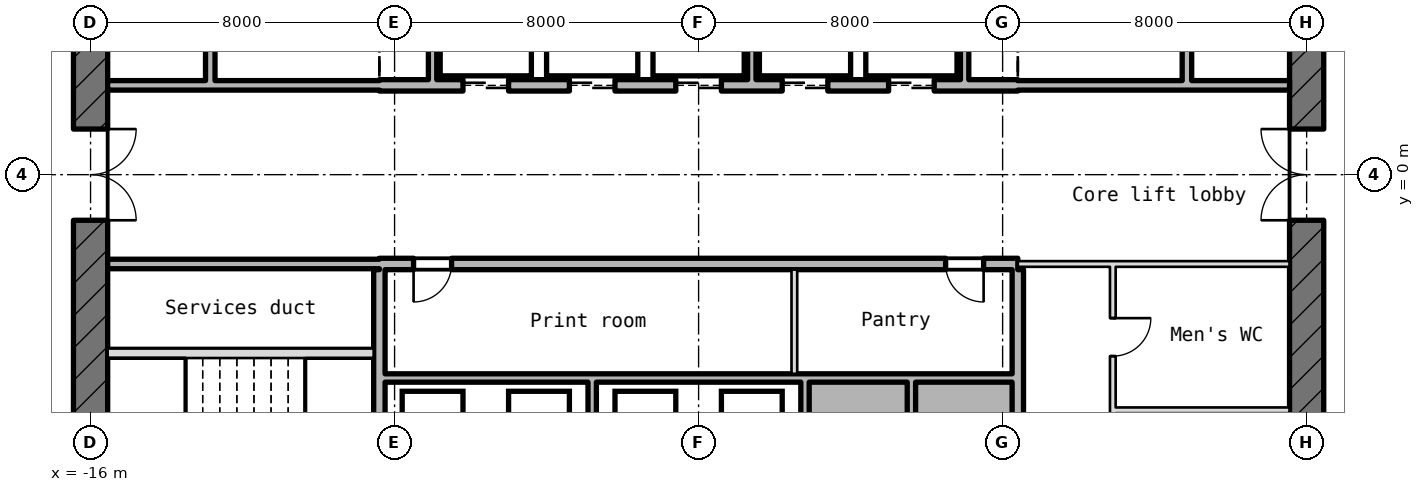
"""IFC4 building model, lengths in metres.
Left out: names, types, materials, properties, quantities, classifications, styles, units other than length and angle.
Written with IfcOpenShell. Run it as: python <this file> out.ifc"""

import sys

from ifc_helpers import new_model, si_unit, direction, frame, frame_2d, origin, place, context, subcontext, project, spatial, rectangle, extrude, element, fill, save


model = new_model("IFC4")
c1 = context("Model", 3, precision=1e-05, world=origin(), true_north=direction((0.0, 1.0)))
c2 = subcontext(c1, "Body", "Model", "MODEL_VIEW")
j1 = project(units=[si_unit("LENGTHUNIT", "METRE"), si_unit("PLANEANGLEUNIT", "RADIAN")], contexts=[c1])
p1 = place(None, origin())
s1 = spatial("IfcSite", under=j1, at=p1, CompositionType="ELEMENT")
p2 = place(p1, origin())
s2 = spatial("IfcBuilding", under=s1, at=p2, CompositionType="ELEMENT")
p3 = place(p2, frame((0.0, 0.0, 155.65)))
s3 = spatial("IfcBuildingStorey", under=s2, at=p3, CompositionType="ELEMENT", Elevation=155.65)
p4 = place(p3, frame((16.0, -10.186, -0.25), z_axis=(0.0, 0.0, 1.0), x_axis=(0.0, 1.0, 0.0)))
e1 = element("IfcWall", 1, at=p4, inside=s3, PredefinedType="SHEAR", context=c2, shape_type="SweptSolid", body=[
    extrude(rectangle(XDim=20.373, YDim=0.9, at=frame_2d((10.186, 0.0))), origin(), (0.0, 0.0, 1.0), 5.47),
])
p5 = place(p4, frame((8.986, 0.0, 0.25)))
e2 = element("IfcOpeningElement", 2, at=p5, cuts=e1, PredefinedType="OPENING", context=c2, shape_type="SweptSolid", body=[
    extrude(rectangle(XDim=2.4, YDim=2.1, at=frame_2d((1.2, 1.05))), frame((0.0, 0.46, 0.0), z_axis=(0.0, -1.0, 0.0), x_axis=(1.0, 0.0, 0.0)), (0.0, 0.0, 1.0), 0.92),
])
p6 = place(p4, frame((13.586, 0.0, 0.25)))
e3 = element("IfcOpeningElement", 3, at=p6, cuts=e1, PredefinedType="OPENING", context=c2, shape_type="SweptSolid", body=[
    extrude(rectangle(XDim=1.2, YDim=2.1, at=frame_2d((0.6, 1.05))), frame((0.0, 0.46, 0.0), z_axis=(0.0, -1.0, 0.0), x_axis=(1.0, 0.0, 0.0)), (0.0, 0.0, 1.0), 0.92),
])
p7 = place(p3, frame((-16.0, 10.186, -0.25), z_axis=(0.0, 0.0, 1.0), x_axis=(0.0, -1.0, 0.0)))
e4 = element("IfcWall", 4, at=p7, inside=s3, PredefinedType="SHEAR", context=c2, shape_type="SweptSolid", body=[
    extrude(rectangle(XDim=20.373, YDim=0.9, at=frame_2d((10.186, 0.0))), origin(), (0.0, 0.0, 1.0), 5.47),
])
p8 = place(p7, frame((8.986, 0.0, 0.25)))
e5 = element("IfcOpeningElement", 5, at=p8, cuts=e4, PredefinedType="OPENING", context=c2, shape_type="SweptSolid", body=[
    extrude(rectangle(XDim=2.4, YDim=2.1, at=frame_2d((1.2, 1.05))), frame((0.0, 0.46, 0.0), z_axis=(0.0, -1.0, 0.0), x_axis=(1.0, 0.0, 0.0)), (0.0, 0.0, 1.0), 0.92),
])
p9 = place(p7, frame((5.586, 0.0, 0.25)))
e6 = element("IfcOpeningElement", 6, at=p9, cuts=e4, PredefinedType="OPENING", context=c2, shape_type="SweptSolid", body=[
    extrude(rectangle(XDim=1.2, YDim=2.1, at=frame_2d((0.6, 1.05))), frame((0.0, 0.46, 0.0), z_axis=(0.0, -1.0, 0.0), x_axis=(1.0, 0.0, 0.0)), (0.0, 0.0, 1.0), 0.92),
])
p10 = place(p3, frame((10.975, -6.2, 0.0), z_axis=(0.0, 0.0, 1.0), x_axis=(1.0, 0.0, 0.0)))
e7 = element("IfcWall", 7, at=p10, inside=s3, PredefinedType="PARTITIONING", context=c2, shape_type="SweptSolid", body=[
    extrude(rectangle(XDim=4.575, YDim=0.15, at=frame_2d((2.288, 0.0))), origin(), (0.0, 0.0, 1.0), 5.22),
])
p11 = place(p3, frame((-8.25, -5.35, 0.0), z_axis=(0.0, 0.0, 1.0), x_axis=(1.0, 0.0, 0.0)))
e8 = element("IfcWall", 8, at=p11, inside=s3, PredefinedType="STANDARD", context=c2, shape_type="SweptSolid", body=[
    extrude(rectangle(XDim=16.5, YDim=0.22, at=frame_2d((8.25, 0.0))), origin(), (0.0, 0.0, 1.0), 5.22),
])
p12 = place(p3, frame((-15.55, -4.7, -0.25), z_axis=(0.0, 0.0, 1.0), x_axis=(1.0, 0.0, 0.0)))
e9 = element("IfcWall", 9, at=p12, inside=s3, PredefinedType="SHEAR", context=c2, shape_type="SweptSolid", body=[
    extrude(rectangle(XDim=7.0, YDim=0.25, at=frame_2d((3.5, 0.0))), origin(), (0.0, 0.0, 1.0), 5.47),
])
p13 = place(p3, frame((-15.55, -2.35, 0.0), z_axis=(0.0, 0.0, 1.0), x_axis=(1.0, 0.0, 0.0)))
e10 = element("IfcWall", 10, at=p13, inside=s3, PredefinedType="STANDARD", context=c2, shape_type="SweptSolid", body=[
    extrude(rectangle(XDim=7.15, YDim=0.25, at=frame_2d((3.575, 0.0))), origin(), (0.0, 0.0, 1.0), 5.22),
])
p14 = place(p3, frame((-8.4, -2.35, -0.25), z_axis=(0.0, 0.0, 1.0), x_axis=(1.0, 0.0, 0.0)))
e11 = element("IfcWall", 11, at=p14, inside=s3, PredefinedType="SHEAR", context=c2, shape_type="SweptSolid", body=[
    extrude(rectangle(XDim=16.8, YDim=0.3, at=frame_2d((8.4, 0.0))), origin(), (0.0, 0.0, 1.0), 5.47),
])
p15 = place(p14, frame((0.9, 0.0, 0.25)))
e12 = element("IfcOpeningElement", 12, at=p15, cuts=e11, PredefinedType="OPENING", context=c2, shape_type="SweptSolid", body=[
    extrude(rectangle(XDim=1.0, YDim=2.1, at=frame_2d((0.5, 1.05))), frame((0.0, 0.16, 0.0), z_axis=(0.0, -1.0, 0.0), x_axis=(1.0, 0.0, 0.0)), (0.0, 0.0, 1.0), 0.32),
])
p16 = place(p14, frame((14.9, 0.0, 0.25)))
e13 = element("IfcOpeningElement", 13, at=p16, cuts=e11, PredefinedType="OPENING", context=c2, shape_type="SweptSolid", body=[
    extrude(rectangle(XDim=1.0, YDim=2.1, at=frame_2d((0.5, 1.05))), frame((0.0, 0.16, 0.0), z_axis=(0.0, -1.0, 0.0), x_axis=(1.0, 0.0, 0.0)), (0.0, 0.0, 1.0), 0.32),
])
p17 = place(p3, frame((8.4, -2.35, 0.0), z_axis=(0.0, 0.0, 1.0), x_axis=(1.0, 0.0, 0.0)))
e14 = element("IfcWall", 14, at=p17, inside=s3, PredefinedType="PARTITIONING", context=c2, shape_type="SweptSolid", body=[
    extrude(rectangle(XDim=7.15, YDim=0.15, at=frame_2d((3.575, 0.0))), origin(), (0.0, 0.0, 1.0), 5.22),
])
p18 = place(p3, frame((-15.55, 2.35, 0.0), z_axis=(0.0, 0.0, 1.0), x_axis=(1.0, 0.0, 0.0)))
e15 = element("IfcWall", 15, at=p18, inside=s3, PredefinedType="STANDARD", context=c2, shape_type="SweptSolid", body=[
    extrude(rectangle(XDim=7.15, YDim=0.25, at=frame_2d((3.575, 0.0))), origin(), (0.0, 0.0, 1.0), 5.22),
])
p19 = place(p3, frame((-8.4, 2.35, -0.25), z_axis=(0.0, 0.0, 1.0), x_axis=(1.0, 0.0, 0.0)))
e16 = element("IfcWall", 16, at=p19, inside=s3, PredefinedType="SHEAR", context=c2, shape_type="SweptSolid", body=[
    extrude(rectangle(XDim=16.8, YDim=0.3, at=frame_2d((8.4, 0.0))), origin(), (0.0, 0.0, 1.0), 5.47),
])
p20 = place(p19, frame((2.2, 0.0, 0.25)))
e17 = element("IfcOpeningElement", 17, at=p20, cuts=e16, PredefinedType="OPENING", context=c2, shape_type="SweptSolid", body=[
    extrude(rectangle(XDim=1.2, YDim=2.1, at=frame_2d((0.6, 1.05))), frame((0.0, 0.16, 0.0), z_axis=(0.0, -1.0, 0.0), x_axis=(1.0, 0.0, 0.0)), (0.0, 0.0, 1.0), 0.32),
])
p21 = place(p19, frame((5.0, 0.0, 0.25)))
e18 = element("IfcOpeningElement", 18, at=p21, cuts=e16, PredefinedType="OPENING", context=c2, shape_type="SweptSolid", body=[
    extrude(rectangle(XDim=1.2, YDim=2.1, at=frame_2d((0.6, 1.05))), frame((0.0, 0.16, 0.0), z_axis=(0.0, -1.0, 0.0), x_axis=(1.0, 0.0, 0.0)), (0.0, 0.0, 1.0), 0.32),
])
p22 = place(p19, frame((7.8, 0.0, 0.25)))
e19 = element("IfcOpeningElement", 19, at=p22, cuts=e16, PredefinedType="OPENING", context=c2, shape_type="SweptSolid", body=[
    extrude(rectangle(XDim=1.2, YDim=2.1, at=frame_2d((0.6, 1.05))), frame((0.0, 0.16, 0.0), z_axis=(0.0, -1.0, 0.0), x_axis=(1.0, 0.0, 0.0)), (0.0, 0.0, 1.0), 0.32),
])
p23 = place(p19, frame((10.6, 0.0, 0.25)))
e20 = element("IfcOpeningElement", 20, at=p23, cuts=e16, PredefinedType="OPENING", context=c2, shape_type="SweptSolid", body=[
    extrude(rectangle(XDim=1.2, YDim=2.1, at=frame_2d((0.6, 1.05))), frame((0.0, 0.16, 0.0), z_axis=(0.0, -1.0, 0.0), x_axis=(1.0, 0.0, 0.0)), (0.0, 0.0, 1.0), 0.32),
])
p24 = place(p19, frame((13.4, 0.0, 0.25)))
e21 = element("IfcOpeningElement", 21, at=p24, cuts=e16, PredefinedType="OPENING", context=c2, shape_type="SweptSolid", body=[
    extrude(rectangle(XDim=1.2, YDim=2.1, at=frame_2d((0.6, 1.05))), frame((0.0, 0.16, 0.0), z_axis=(0.0, -1.0, 0.0), x_axis=(1.0, 0.0, 0.0)), (0.0, 0.0, 1.0), 0.32),
])
p25 = place(p3, frame((8.4, 2.35, 0.0), z_axis=(0.0, 0.0, 1.0), x_axis=(1.0, 0.0, 0.0)))
e22 = element("IfcWall", 22, at=p25, inside=s3, PredefinedType="STANDARD", context=c2, shape_type="SweptSolid", body=[
    extrude(rectangle(XDim=7.15, YDim=0.25, at=frame_2d((3.575, 0.0))), origin(), (0.0, 0.0, 1.0), 5.22),
])
p26 = place(p3, frame((-12.85, 2.475, 0.0), z_axis=(0.0, 0.0, 1.0), x_axis=(0.0, 1.0, 0.0)))
e23 = element("IfcWall", 23, at=p26, inside=s3, PredefinedType="STANDARD", context=c2, shape_type="SweptSolid", body=[
    extrude(rectangle(XDim=3.05, YDim=0.25, at=frame_2d((1.525, 0.0))), origin(), (0.0, 0.0, 1.0), 5.22),
])
p27 = place(p3, frame((-8.4, -8.75, -0.25), z_axis=(0.0, 0.0, 1.0), x_axis=(0.0, 1.0, 0.0)))
e24 = element("IfcWall", 24, at=p27, inside=s3, PredefinedType="SHEAR", context=c2, shape_type="SweptSolid", body=[
    extrude(rectangle(XDim=6.25, YDim=0.3, at=frame_2d((3.125, 0.0))), origin(), (0.0, 0.0, 1.0), 5.47),
])
p28 = place(p3, frame((-7.0, 2.5, 0.0), z_axis=(0.0, 0.0, 1.0), x_axis=(0.0, 1.0, 0.0)))
e25 = element("IfcWall", 25, at=p28, inside=s3, PredefinedType="STANDARD", context=c2, shape_type="SweptSolid", body=[
    extrude(rectangle(XDim=2.74, YDim=0.22, at=frame_2d((1.37, 0.0))), origin(), (0.0, 0.0, 1.0), 5.22),
])
p29 = place(p3, frame((-2.8, -8.35, 0.0), z_axis=(0.0, 0.0, 1.0), x_axis=(0.0, 1.0, 0.0)))
e26 = element("IfcWall", 26, at=p29, inside=s3, PredefinedType="STANDARD", context=c2, shape_type="SweptSolid", body=[
    extrude(rectangle(XDim=2.89, YDim=0.22, at=frame_2d((1.445, 0.0))), origin(), (0.0, 0.0, 1.0), 5.22),
])
p30 = place(p3, frame((1.4, 2.5, 0.0), z_axis=(0.0, 0.0, 1.0), x_axis=(0.0, 1.0, 0.0)))
e27 = element("IfcWall", 27, at=p30, inside=s3, PredefinedType="STANDARD", context=c2, shape_type="SweptSolid", body=[
    extrude(rectangle(XDim=2.74, YDim=0.22, at=frame_2d((1.37, 0.0))), origin(), (0.0, 0.0, 1.0), 5.22),
])
p31 = place(p3, frame((2.52, -5.24, 0.0), z_axis=(0.0, 0.0, 1.0), x_axis=(0.0, 1.0, 0.0)))
e28 = element("IfcWall", 28, at=p31, inside=s3, PredefinedType="PARTITIONING", context=c2, shape_type="SweptSolid", body=[
    extrude(rectangle(XDim=2.74, YDim=0.15, at=frame_2d((1.37, 0.0))), origin(), (0.0, 0.0, 1.0), 5.22),
])
for number, where, z_axis, x_axis in (
    (29, (2.8, -8.24, 0.0), (0.0, 0.0, 1.0), (0.0, 1.0, 0.0)),
    (30, (5.6, -8.24, 0.0), (0.0, 0.0, 1.0), (0.0, 1.0, 0.0)),
):
    element("IfcWall", number, at=place(p3, frame(where, z_axis=z_axis, x_axis=x_axis)), inside=s3, PredefinedType="STANDARD", context=c2, shape_type="SweptSolid", body=[
        extrude(rectangle(XDim=2.78, YDim=0.22, at=frame_2d((1.39, 0.0))), origin(), (0.0, 0.0, 1.0), 5.22),
    ])
p32 = place(p3, frame((7.0, 2.5, 0.0), z_axis=(0.0, 0.0, 1.0), x_axis=(0.0, 1.0, 0.0)))
e31 = element("IfcWall", 31, at=p32, inside=s3, PredefinedType="STANDARD", context=c2, shape_type="SweptSolid", body=[
    extrude(rectangle(XDim=2.74, YDim=0.22, at=frame_2d((1.37, 0.0))), origin(), (0.0, 0.0, 1.0), 5.22),
])
p33 = place(p3, frame((8.4, -8.35, -0.25), z_axis=(0.0, 0.0, 1.0), x_axis=(0.0, 1.0, 0.0)))
e32 = element("IfcWall", 32, at=p33, inside=s3, PredefinedType="SHEAR", context=c2, shape_type="SweptSolid", body=[
    extrude(rectangle(XDim=5.85, YDim=0.3, at=frame_2d((2.925, 0.0))), origin(), (0.0, 0.0, 1.0), 5.47),
])
p34 = place(p3, frame((10.9, -12.55, 0.0), z_axis=(0.0, 0.0, 1.0), x_axis=(0.0, 1.0, 0.0)))
e33 = element("IfcWall", 33, at=p34, inside=s3, PredefinedType="PARTITIONING", context=c2, shape_type="SweptSolid", body=[
    extrude(rectangle(XDim=10.125, YDim=0.15, at=frame_2d((5.062, 0.0))), origin(), (0.0, 0.0, 1.0), 5.22),
])
p35 = place(p34, frame((7.775, 0.0, 0.0)))
e34 = element("IfcOpeningElement", 34, at=p35, cuts=e33, PredefinedType="OPENING", context=c2, shape_type="SweptSolid", body=[
    extrude(rectangle(XDim=1.0, YDim=2.1, at=frame_2d((0.5, 1.05))), frame((0.0, 0.085, 0.0), z_axis=(0.0, -1.0, 0.0), x_axis=(1.0, 0.0, 0.0)), (0.0, 0.0, 1.0), 0.17),
])
p36 = place(p34, frame((2.675, 0.0, 0.0)))
e35 = element("IfcOpeningElement", 35, at=p36, cuts=e33, PredefinedType="OPENING", context=c2, shape_type="SweptSolid", body=[
    extrude(rectangle(XDim=1.0, YDim=2.1, at=frame_2d((0.5, 1.05))), frame((0.0, 0.085, 0.0), z_axis=(0.0, -1.0, 0.0), x_axis=(1.0, 0.0, 0.0)), (0.0, 0.0, 1.0), 0.17),
])
p37 = place(p3, frame((12.85, 2.475, 0.0), z_axis=(0.0, 0.0, 1.0), x_axis=(0.0, 1.0, 0.0)))
e36 = element("IfcWall", 36, at=p37, inside=s3, PredefinedType="STANDARD", context=c2, shape_type="SweptSolid", body=[
    extrude(rectangle(XDim=3.05, YDim=0.25, at=frame_2d((1.525, 0.0))), origin(), (0.0, 0.0, 1.0), 5.22),
])
p38 = place(p20, origin())
e37 = element("IfcDoor", 37, at=p38, inside=s3, OperationType="DOUBLE_DOOR_SLIDING", PredefinedType="DOOR", context=c2, shape_type="SweptSolid", body=[
    extrude(rectangle(XDim=1.2, YDim=2.1, at=frame_2d((0.6, 1.05))), frame((0.0, 0.025, 0.0), z_axis=(0.0, -1.0, 0.0), x_axis=(1.0, 0.0, 0.0)), (0.0, 0.0, 1.0), 0.05),
])
fill(e17, e37)
p39 = place(p21, origin())
e38 = element("IfcDoor", 38, at=p39, inside=s3, OperationType="DOUBLE_DOOR_SLIDING", PredefinedType="DOOR", context=c2, shape_type="SweptSolid", body=[
    extrude(rectangle(XDim=1.2, YDim=2.1, at=frame_2d((0.6, 1.05))), frame((0.0, 0.025, 0.0), z_axis=(0.0, -1.0, 0.0), x_axis=(1.0, 0.0, 0.0)), (0.0, 0.0, 1.0), 0.05),
])
fill(e18, e38)
p40 = place(p22, origin())
e39 = element("IfcDoor", 39, at=p40, inside=s3, OperationType="DOUBLE_DOOR_SLIDING", PredefinedType="DOOR", context=c2, shape_type="SweptSolid", body=[
    extrude(rectangle(XDim=1.2, YDim=2.1, at=frame_2d((0.6, 1.05))), frame((0.0, 0.025, 0.0), z_axis=(0.0, -1.0, 0.0), x_axis=(1.0, 0.0, 0.0)), (0.0, 0.0, 1.0), 0.05),
])
fill(e19, e39)
p41 = place(p23, origin())
e40 = element("IfcDoor", 40, at=p41, inside=s3, OperationType="DOUBLE_DOOR_SLIDING", PredefinedType="DOOR", context=c2, shape_type="SweptSolid", body=[
    extrude(rectangle(XDim=1.2, YDim=2.1, at=frame_2d((0.6, 1.05))), frame((0.0, 0.025, 0.0), z_axis=(0.0, -1.0, 0.0), x_axis=(1.0, 0.0, 0.0)), (0.0, 0.0, 1.0), 0.05),
])
fill(e20, e40)
p42 = place(p24, origin())
e41 = element("IfcDoor", 41, at=p42, inside=s3, OperationType="DOUBLE_DOOR_SLIDING", PredefinedType="DOOR", context=c2, shape_type="SweptSolid", body=[
    extrude(rectangle(XDim=1.2, YDim=2.1, at=frame_2d((0.6, 1.05))), frame((0.0, 0.025, 0.0), z_axis=(0.0, -1.0, 0.0), x_axis=(1.0, 0.0, 0.0)), (0.0, 0.0, 1.0), 0.05),
])
fill(e21, e41)
p43 = place(p8, origin())
e42 = element("IfcDoor", 42, at=p43, inside=s3, OperationType="DOUBLE_DOOR_SINGLE_SWING", PredefinedType="DOOR", context=c2, shape_type="SweptSolid", body=[
    extrude(rectangle(XDim=2.4, YDim=2.1, at=frame_2d((1.2, 1.05))), frame((0.0, 0.025, 0.0), z_axis=(0.0, -1.0, 0.0), x_axis=(1.0, 0.0, 0.0)), (0.0, 0.0, 1.0), 0.05),
])
fill(e5, e42)
p44 = place(p5, origin())
e43 = element("IfcDoor", 43, at=p44, inside=s3, OperationType="DOUBLE_DOOR_SINGLE_SWING", PredefinedType="DOOR", context=c2, shape_type="SweptSolid", body=[
    extrude(rectangle(XDim=2.4, YDim=2.1, at=frame_2d((1.2, 1.05))), frame((0.0, 0.025, 0.0), z_axis=(0.0, -1.0, 0.0), x_axis=(1.0, 0.0, 0.0)), (0.0, 0.0, 1.0), 0.05),
])
fill(e2, e43)
p45 = place(p15, frame((1.0, 0.0, 0.0), z_axis=(0.0, 0.0, 1.0), x_axis=(-1.0, 0.0, 0.0)))
e44 = element("IfcDoor", 44, at=p45, inside=s3, OperationType="SINGLE_SWING_LEFT", PredefinedType="DOOR", context=c2, shape_type="SweptSolid", body=[
    extrude(rectangle(XDim=1.0, YDim=2.1, at=frame_2d((0.5, 1.05))), frame((0.0, 0.025, 0.0), z_axis=(0.0, -1.0, 0.0), x_axis=(1.0, 0.0, 0.0)), (0.0, 0.0, 1.0), 0.05),
])
fill(e12, e44)
p46 = place(p16, frame((1.0, 0.0, 0.0), z_axis=(0.0, 0.0, 1.0), x_axis=(-1.0, 0.0, 0.0)))
e45 = element("IfcDoor", 45, at=p46, inside=s3, OperationType="SINGLE_SWING_LEFT", PredefinedType="DOOR", context=c2, shape_type="SweptSolid", body=[
    extrude(rectangle(XDim=1.0, YDim=2.1, at=frame_2d((0.5, 1.05))), frame((0.0, 0.025, 0.0), z_axis=(0.0, -1.0, 0.0), x_axis=(1.0, 0.0, 0.0)), (0.0, 0.0, 1.0), 0.05),
])
fill(e13, e45)
p47 = place(p35, frame((1.0, 0.0, 0.0), z_axis=(0.0, 0.0, 1.0), x_axis=(-1.0, 0.0, 0.0)))
e46 = element("IfcDoor", 46, at=p47, inside=s3, OperationType="SINGLE_SWING_LEFT", PredefinedType="DOOR", context=c2, shape_type="SweptSolid", body=[
    extrude(rectangle(XDim=1.0, YDim=2.1, at=frame_2d((0.5, 1.05))), frame((0.0, 0.025, 0.0), z_axis=(0.0, -1.0, 0.0), x_axis=(1.0, 0.0, 0.0)), (0.0, 0.0, 1.0), 0.05),
])
fill(e34, e46)
save(model, sys.argv[1])
